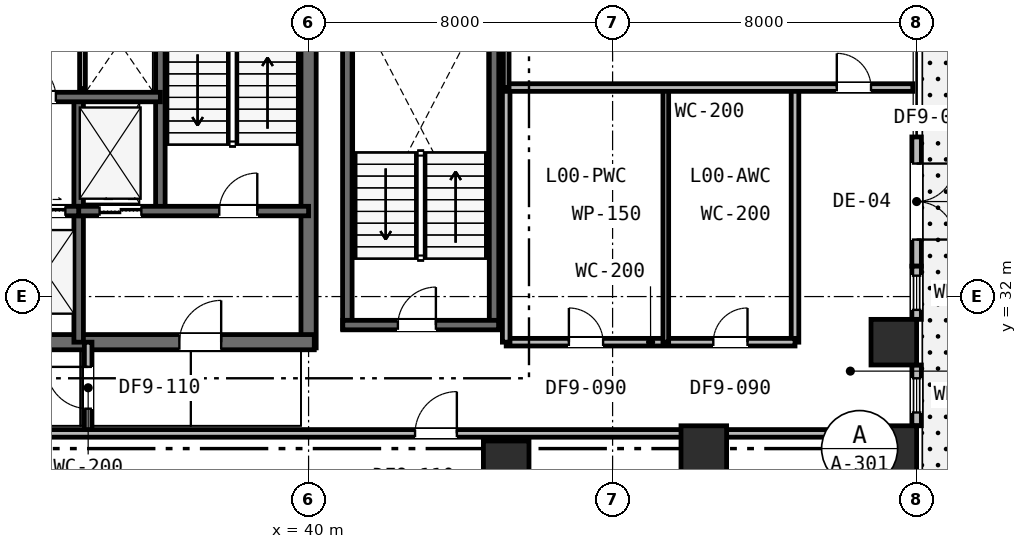
"""IFC4 building model, lengths in metres.
Left out: names, types, materials, properties, quantities, classifications, styles, units other than length and angle.
Written with IfcOpenShell. Run it as: python <this file> out.ifc"""

import sys

from ifc_helpers import new_model, si_unit, direction, frame, frame_2d, origin, origin_2d, place, context, subcontext, project, spatial, rectangle, extrude, element, fill, save


model = new_model("IFC4")
c1 = context("Model", 3, precision=1e-05, world=origin(), true_north=direction((0.0, 1.0)))
c2 = subcontext(c1, "Body", "Model", "MODEL_VIEW")
j1 = project(units=[si_unit("LENGTHUNIT", "METRE"), si_unit("PLANEANGLEUNIT", "RADIAN")], contexts=[c1])
p1 = place(None, origin())
s1 = spatial("IfcSite", under=j1, at=p1, CompositionType="ELEMENT")
p2 = place(p1, origin())
s2 = spatial("IfcBuilding", under=s1, at=p2, CompositionType="ELEMENT")
p3 = place(p2, origin())
s3 = spatial("IfcBuildingStorey", under=s2, at=p3, CompositionType="ELEMENT", Elevation=0.0)
p4 = place(p3, frame((40.0, 30.65, 0.0), z_axis=(0.0, 0.0, 1.0), x_axis=(0.0, 1.0, 0.0)))
e1 = element("IfcWall", 1, at=p4, inside=s3, PredefinedType="SHEAR", context=c2, shape_type="SweptSolid", body=[
    extrude(rectangle(XDim=12.3, YDim=0.4, at=frame_2d((6.15, 0.0))), origin(), (0.0, 0.0, 1.0), 6.0),
])
p5 = place(p3, frame((28.95, 30.8, 0.0), z_axis=(0.0, 0.0, 1.0), x_axis=(1.0, 0.0, 0.0)))
e2 = element("IfcWall", 2, at=p5, inside=s3, PredefinedType="SHEAR", context=c2, shape_type="SweptSolid", body=[
    extrude(rectangle(XDim=11.2, YDim=0.4, at=frame_2d((5.6, 0.0))), origin(), (0.0, 0.0, 1.0), 6.0),
])
p6 = place(p5, frame((7.65, 0.0, 0.0)))
e3 = element("IfcOpeningElement", 3, at=p6, cuts=e2, PredefinedType="OPENING", context=c2, shape_type="SweptSolid", body=[
    extrude(rectangle(XDim=1.1, YDim=2.15, at=frame_2d((0.55, 1.075))), frame((0.0, 0.21, 0.0), z_axis=(0.0, -1.0, 0.0), x_axis=(1.0, 0.0, 0.0)), (0.0, 0.0, 1.0), 0.42),
])
p7 = place(p3, frame((36.1, 34.25, 0.0), z_axis=(0.0, 0.0, 1.0), x_axis=(0.0, 1.0, 0.0)))
e4 = element("IfcWall", 4, at=p7, inside=s3, PredefinedType="SHEAR", context=c2, shape_type="SweptSolid", body=[
    extrude(rectangle(XDim=8.65, YDim=0.25, at=frame_2d((4.325, 0.0))), origin(), (0.0, 0.0, 1.0), 6.0),
])
p8 = place(p3, frame((33.95, 30.8, 0.0), z_axis=(0.0, 0.0, 1.0), x_axis=(0.0, 1.0, 0.0)))
e5 = element("IfcWall", 5, at=p8, inside=s3, PredefinedType="SHEAR", context=c2, shape_type="SweptSolid", body=[
    extrude(rectangle(XDim=6.45, YDim=0.25, at=frame_2d((3.225, 0.0))), origin(), (0.0, 0.0, 1.0), 6.0),
])
p9 = place(p3, frame((33.95, 34.25, 0.0), z_axis=(0.0, 0.0, 1.0), x_axis=(1.0, 0.0, 0.0)))
e6 = element("IfcWall", 6, at=p9, inside=s3, PredefinedType="SHEAR", context=c2, shape_type="SweptSolid", body=[
    extrude(rectangle(XDim=6.05, YDim=0.25, at=frame_2d((3.025, 0.0))), origin(), (0.0, 0.0, 1.0), 6.0),
])
p10 = place(p9, frame((3.7, 0.0, 0.0)))
e7 = element("IfcOpeningElement", 7, at=p10, cuts=e6, PredefinedType="OPENING", context=c2, shape_type="SweptSolid", body=[
    extrude(rectangle(XDim=1.0, YDim=2.15, at=frame_2d((0.5, 1.075))), frame((0.0, 0.135, 0.0), z_axis=(0.0, -1.0, 0.0), x_axis=(1.0, 0.0, 0.0)), (0.0, 0.0, 1.0), 0.27),
])
p11 = place(p9, frame((0.55, 0.0, 0.0)))
e8 = element("IfcOpeningElement", 8, at=p11, cuts=e6, PredefinedType="OPENING", context=c2, shape_type="SweptSolid", body=[
    extrude(rectangle(XDim=1.1, YDim=2.15, at=frame_2d((0.55, 1.075))), frame((0.0, 0.135, 0.0), z_axis=(0.0, -1.0, 0.0), x_axis=(1.0, 0.0, 0.0)), (0.0, 0.0, 1.0), 0.27),
])
p12 = place(p3, frame((28.95, 34.25, 0.0), z_axis=(0.0, 0.0, 1.0), x_axis=(1.0, 0.0, 0.0)))
e9 = element("IfcWall", 9, at=p12, inside=s3, PredefinedType="SHEAR", context=c2, shape_type="SweptSolid", body=[
    extrude(rectangle(XDim=5.0, YDim=0.25, at=frame_2d((2.5, 0.0))), origin(), (0.0, 0.0, 1.0), 6.0),
])
p13 = place(p12, frame((0.3, 0.0, 0.0)))
e10 = element("IfcOpeningElement", 10, at=p13, cuts=e9, PredefinedType="OPENING", context=c2, shape_type="SweptSolid", body=[
    extrude(rectangle(XDim=1.05, YDim=2.15, at=frame_2d((0.525, 1.075))), frame((0.0, 0.135, 0.0), z_axis=(0.0, -1.0, 0.0), x_axis=(1.0, 0.0, 0.0)), (0.0, 0.0, 1.0), 0.27),
])
p14 = place(p12, frame((1.95, 0.0, 0.0)))
e11 = element("IfcOpeningElement", 11, at=p14, cuts=e9, PredefinedType="OPENING", context=c2, shape_type="SweptSolid", body=[
    extrude(rectangle(XDim=1.05, YDim=2.15, at=frame_2d((0.525, 1.075))), frame((0.0, 0.135, 0.0), z_axis=(0.0, -1.0, 0.0), x_axis=(1.0, 0.0, 0.0)), (0.0, 0.0, 1.0), 0.27),
])
p15 = place(p12, frame((3.6, 0.0, 0.0)))
e12 = element("IfcOpeningElement", 12, at=p15, cuts=e9, PredefinedType="OPENING", context=c2, shape_type="SweptSolid", body=[
    extrude(rectangle(XDim=1.05, YDim=2.15, at=frame_2d((0.525, 1.075))), frame((0.0, 0.135, 0.0), z_axis=(0.0, -1.0, 0.0), x_axis=(1.0, 0.0, 0.0)), (0.0, 0.0, 1.0), 0.27),
])
p16 = place(p3, frame((19.9, 37.25, 0.0), z_axis=(0.0, 0.0, 1.0), x_axis=(1.0, 0.0, 0.0)))
e13 = element("IfcWall", 13, at=p16, inside=s3, PredefinedType="SHEAR", context=c2, shape_type="SweptSolid", body=[
    extrude(rectangle(XDim=16.2, YDim=0.25, at=frame_2d((8.1, 0.0))), origin(), (0.0, 0.0, 1.0), 6.0),
])
p17 = place(p16, frame((12.55, 0.0, 0.0)))
e14 = element("IfcOpeningElement", 14, at=p17, cuts=e13, PredefinedType="OPENING", context=c2, shape_type="SweptSolid", body=[
    extrude(rectangle(XDim=0.9, YDim=2.15, at=frame_2d((0.45, 1.075))), frame((0.0, 0.135, 0.0), z_axis=(0.0, -1.0, 0.0), x_axis=(1.0, 0.0, 0.0)), (0.0, 0.0, 1.0), 0.27),
])
p18 = place(p16, frame((2.5, 0.0, 0.0)))
e15 = element("IfcOpeningElement", 15, at=p18, cuts=e13, PredefinedType="OPENING", context=c2, shape_type="SweptSolid", body=[
    extrude(rectangle(XDim=1.05, YDim=2.15, at=frame_2d((0.525, 1.075))), frame((0.0, 0.135, 0.0), z_axis=(0.0, -1.0, 0.0), x_axis=(1.0, 0.0, 0.0)), (0.0, 0.0, 1.0), 0.27),
])
p19 = place(p16, frame((4.4, 0.0, 0.0)))
e16 = element("IfcOpeningElement", 16, at=p19, cuts=e13, PredefinedType="OPENING", context=c2, shape_type="SweptSolid", body=[
    extrude(rectangle(XDim=1.05, YDim=2.15, at=frame_2d((0.525, 1.075))), frame((0.0, 0.135, 0.0), z_axis=(0.0, -1.0, 0.0), x_axis=(1.0, 0.0, 0.0)), (0.0, 0.0, 1.0), 0.27),
])
p20 = place(p16, frame((6.3, 0.0, 0.0)))
e17 = element("IfcOpeningElement", 17, at=p20, cuts=e13, PredefinedType="OPENING", context=c2, shape_type="SweptSolid", body=[
    extrude(rectangle(XDim=1.05, YDim=2.15, at=frame_2d((0.525, 1.075))), frame((0.0, 0.135, 0.0), z_axis=(0.0, -1.0, 0.0), x_axis=(1.0, 0.0, 0.0)), (0.0, 0.0, 1.0), 0.27),
])
p21 = place(p16, frame((8.3, 0.0, 0.0)))
e18 = element("IfcOpeningElement", 18, at=p21, cuts=e13, PredefinedType="OPENING", context=c2, shape_type="SweptSolid", body=[
    extrude(rectangle(XDim=1.1, YDim=2.15, at=frame_2d((0.55, 1.075))), frame((0.0, 0.135, 0.0), z_axis=(0.0, -1.0, 0.0), x_axis=(1.0, 0.0, 0.0)), (0.0, 0.0, 1.0), 0.27),
])
p22 = place(p16, frame((10.4, 0.0, 0.0)))
e19 = element("IfcOpeningElement", 19, at=p22, cuts=e13, PredefinedType="OPENING", context=c2, shape_type="SweptSolid", body=[
    extrude(rectangle(XDim=1.1, YDim=2.15, at=frame_2d((0.55, 1.075))), frame((0.0, 0.135, 0.0), z_axis=(0.0, -1.0, 0.0), x_axis=(1.0, 0.0, 0.0)), (0.0, 0.0, 1.0), 0.27),
])
for number, where, z_axis, x_axis in (
    (20, (41.02, 31.15, 0.0), (0.0, 0.0, 1.0), (0.0, 1.0, 0.0)),
    (21, (44.88, 31.15, 0.0), (0.0, 0.0, 1.0), (0.0, 1.0, 0.0)),
):
    element("IfcWall", number, at=place(p3, frame(where, z_axis=z_axis, x_axis=x_axis)), inside=s3, PredefinedType="SHEAR", context=c2, shape_type="SweptSolid", body=[
        extrude(rectangle(XDim=8.8, YDim=0.25, at=frame_2d((4.4, 0.0))), origin(), (0.0, 0.0, 1.0), 6.0),
    ])
p23 = place(p3, frame((40.9, 31.25, 0.0), z_axis=(0.0, 0.0, 1.0), x_axis=(1.0, 0.0, 0.0)))
e22 = element("IfcWall", 22, at=p23, inside=s3, PredefinedType="SHEAR", context=c2, shape_type="SweptSolid", body=[
    extrude(rectangle(XDim=4.1, YDim=0.25, at=frame_2d((2.05, 0.0))), origin(), (0.0, 0.0, 1.0), 6.0),
])
p24 = place(p23, frame((1.45, 0.0, 0.0)))
e23 = element("IfcOpeningElement", 23, at=p24, cuts=e22, PredefinedType="OPENING", context=c2, shape_type="SweptSolid", body=[
    extrude(rectangle(XDim=1.0, YDim=2.15, at=frame_2d((0.5, 1.075))), frame((0.0, 0.135, 0.0), z_axis=(0.0, -1.0, 0.0), x_axis=(1.0, 0.0, 0.0)), (0.0, 0.0, 1.0), 0.27),
])
for number, where, z_axis, x_axis in (
    (24, (45.2, 27.6, 0.0), (0.0, 0.0, 1.0), (1.0, 0.0, 0.0)),
    (25, (50.4, 28.0, 0.0), (0.0, 0.0, 1.0), (1.0, 0.0, 0.0)),
    (26, (55.4, 28.0, 0.0), (0.0, 0.0, 1.0), (1.0, 0.0, 0.0)),
    (27, (55.4, 30.8, 0.0), (0.0, 0.0, 1.0), (1.0, 0.0, 0.0)),
):
    element("IfcColumn", number, at=place(p3, frame(where, z_axis=z_axis, x_axis=x_axis)), inside=s3, PredefinedType="COLUMN", context=c2, shape_type="SweptSolid", body=[
        extrude(rectangle(XDim=1.2, YDim=1.2, at=origin_2d()), origin(), (0.0, 0.0, 1.0), 6.0),
    ])
p25 = place(p3, frame((56.0, 36.2, 0.0), z_axis=(0.0, 0.0, 1.0), x_axis=(0.0, -1.0, 0.0)))
e28 = element("IfcWall", 28, at=p25, inside=s3, PredefinedType="STANDARD", context=c2, shape_type="SweptSolid", body=[
    extrude(rectangle(XDim=3.4, YDim=0.25, at=frame_2d((1.7, 0.0))), origin(), (0.0, 0.0, 1.0), 5.67),
])
p26 = place(p25, frame((0.7, 0.0, 0.0)))
e29 = element("IfcOpeningElement", 29, at=p26, cuts=e28, PredefinedType="OPENING", context=c2, shape_type="SweptSolid", body=[
    extrude(rectangle(XDim=2.0, YDim=2.4, at=frame_2d((1.0, 1.2))), frame((0.0, 0.135, 0.0), z_axis=(0.0, -1.0, 0.0), x_axis=(1.0, 0.0, 0.0)), (0.0, 0.0, 1.0), 0.27),
])
p27 = place(p3, frame((56.0, 28.6, 0.0), z_axis=(0.0, 0.0, 1.0), x_axis=(0.0, 1.0, 0.0)))
e30 = element("IfcWall", 30, at=p27, inside=s3, PredefinedType="STANDARD", context=c2, shape_type="SweptSolid", body=[
    extrude(rectangle(XDim=1.6, YDim=0.25, at=frame_2d((0.8, 0.0))), origin(), (0.0, 0.0, 1.0), 5.67),
])
p28 = place(p27, frame((0.35, 0.0, 0.9)))
e31 = element("IfcOpeningElement", 31, at=p28, cuts=e30, PredefinedType="OPENING", context=c2, shape_type="SweptSolid", body=[
    extrude(rectangle(XDim=0.9, YDim=1.55, at=frame_2d((0.45, 0.775))), frame((0.0, 0.135, 0.0), z_axis=(0.0, -1.0, 0.0), x_axis=(1.0, 0.0, 0.0)), (0.0, 0.0, 1.0), 0.27),
])
p29 = place(p3, frame((56.0, 31.4, 0.0), z_axis=(0.0, 0.0, 1.0), x_axis=(0.0, 1.0, 0.0)))
e32 = element("IfcWall", 32, at=p29, inside=s3, PredefinedType="STANDARD", context=c2, shape_type="SweptSolid", body=[
    extrude(rectangle(XDim=1.4, YDim=0.25, at=frame_2d((0.7, 0.0))), origin(), (0.0, 0.0, 1.0), 5.67),
])
p30 = place(p29, frame((0.25, 0.0, 0.9)))
e33 = element("IfcOpeningElement", 33, at=p30, cuts=e32, PredefinedType="OPENING", context=c2, shape_type="SweptSolid", body=[
    extrude(rectangle(XDim=0.9, YDim=1.55, at=frame_2d((0.45, 0.775))), frame((0.0, 0.135, 0.0), z_axis=(0.0, -1.0, 0.0), x_axis=(1.0, 0.0, 0.0)), (0.0, 0.0, 1.0), 0.27),
])
p31 = place(p3, frame((34.05, 37.473, 0.0), z_axis=(0.0, 0.0, 1.0), x_axis=(0.0, 1.0, 0.0)))
e34 = element("IfcWall", 34, at=p31, inside=s3, PredefinedType="PLUMBINGWALL", context=c2, shape_type="SweptSolid", body=[
    extrude(rectangle(XDim=2.577, YDim=0.15, at=frame_2d((1.288, 0.0))), origin(), (0.0, 0.0, 1.0), 5.67),
])
p32 = place(p3, frame((34.2, 28.4, 0.0), z_axis=(0.0, 0.0, 1.0), x_axis=(0.0, 1.0, 0.0)))
e35 = element("IfcWall", 35, at=p32, inside=s3, PredefinedType="PARTITIONING", context=c2, shape_type="SweptSolid", body=[
    extrude(rectangle(XDim=2.4, YDim=0.2, at=frame_2d((1.2, 0.0))), origin(), (0.0, 0.0, 1.0), 5.26),
])
p33 = place(p32, frame((0.65, 0.0, 0.0)))
e36 = element("IfcOpeningElement", 36, at=p33, cuts=e35, PredefinedType="OPENING", context=c2, shape_type="SweptSolid", body=[
    extrude(rectangle(XDim=1.1, YDim=2.15, at=frame_2d((0.55, 1.075))), frame((0.0, 0.11, 0.0), z_axis=(0.0, -1.0, 0.0), x_axis=(1.0, 0.0, 0.0)), (0.0, 0.0, 1.0), 0.22),
])
p34 = place(p3, frame((52.8, 30.8, 0.0), z_axis=(0.0, 0.0, 1.0), x_axis=(0.0, 1.0, 0.0)))
e37 = element("IfcWall", 37, at=p34, inside=s3, PredefinedType="PARTITIONING", context=c2, shape_type="SweptSolid", body=[
    extrude(rectangle(XDim=6.7, YDim=0.2, at=frame_2d((3.35, 0.0))), origin(), (0.0, 0.0, 1.0), 5.02),
])
p35 = place(p3, frame((45.2, 30.8, 0.0), z_axis=(0.0, 0.0, 1.0), x_axis=(1.0, 0.0, 0.0)))
e38 = element("IfcWall", 38, at=p35, inside=s3, PredefinedType="PARTITIONING", context=c2, shape_type="SweptSolid", body=[
    extrude(rectangle(XDim=7.6, YDim=0.2, at=frame_2d((3.8, 0.0))), origin(), (0.0, 0.0, 1.0), 5.02),
])
p36 = place(p35, frame((1.65, 0.0, 0.0)))
e39 = element("IfcOpeningElement", 39, at=p36, cuts=e38, PredefinedType="OPENING", context=c2, shape_type="SweptSolid", body=[
    extrude(rectangle(XDim=0.9, YDim=2.15, at=frame_2d((0.45, 1.075))), frame((0.0, 0.11, 0.0), z_axis=(0.0, -1.0, 0.0), x_axis=(1.0, 0.0, 0.0)), (0.0, 0.0, 1.0), 0.22),
])
p37 = place(p35, frame((5.45, 0.0, 0.0)))
e40 = element("IfcOpeningElement", 40, at=p37, cuts=e38, PredefinedType="OPENING", context=c2, shape_type="SweptSolid", body=[
    extrude(rectangle(XDim=0.9, YDim=2.15, at=frame_2d((0.45, 1.075))), frame((0.0, 0.11, 0.0), z_axis=(0.0, -1.0, 0.0), x_axis=(1.0, 0.0, 0.0)), (0.0, 0.0, 1.0), 0.22),
])
p38 = place(p3, frame((45.2, 30.8, 0.0), z_axis=(0.0, 0.0, 1.0), x_axis=(0.0, 1.0, 0.0)))
e41 = element("IfcWall", 41, at=p38, inside=s3, PredefinedType="PARTITIONING", context=c2, shape_type="SweptSolid", body=[
    extrude(rectangle(XDim=6.7, YDim=0.2, at=frame_2d((3.35, 0.0))), origin(), (0.0, 0.0, 1.0), 5.02),
])
p39 = place(p3, frame((49.4, 30.8, 0.0), z_axis=(0.0, 0.0, 1.0), x_axis=(0.0, 1.0, 0.0)))
e42 = element("IfcWall", 42, at=p39, inside=s3, PredefinedType="PARTITIONING", context=c2, shape_type="SweptSolid", body=[
    extrude(rectangle(XDim=6.7, YDim=0.15, at=frame_2d((3.35, 0.0))), origin(), (0.0, 0.0, 1.0), 5.02),
])
p40 = place(p3, frame((45.2, 37.5, 0.0), z_axis=(0.0, 0.0, 1.0), x_axis=(1.0, 0.0, 0.0)))
e43 = element("IfcWall", 43, at=p40, inside=s3, PredefinedType="PARTITIONING", context=c2, shape_type="SweptSolid", body=[
    extrude(rectangle(XDim=10.7, YDim=0.2, at=frame_2d((5.35, 0.0))), origin(), (0.0, 0.0, 1.0), 5.02),
])
p41 = place(p40, frame((8.7, 0.0, 0.0)))
e44 = element("IfcOpeningElement", 44, at=p41, cuts=e43, PredefinedType="OPENING", context=c2, shape_type="SweptSolid", body=[
    extrude(rectangle(XDim=0.9, YDim=2.15, at=frame_2d((0.45, 1.075))), frame((0.0, 0.11, 0.0), z_axis=(0.0, -1.0, 0.0), x_axis=(1.0, 0.0, 0.0)), (0.0, 0.0, 1.0), 0.22),
])
p42 = place(p3, frame((45.2, 37.5, 0.0), z_axis=(0.0, 0.0, 1.0), x_axis=(0.0, 1.0, 0.0)))
e45 = element("IfcWall", 45, at=p42, inside=s3, PredefinedType="PARTITIONING", context=c2, shape_type="SweptSolid", body=[
    extrude(rectangle(XDim=10.4, YDim=0.15, at=frame_2d((5.2, 0.0))), origin(), (0.0, 0.0, 1.0), 5.02),
])
p43 = place(p3, frame((3.1, 28.4, 0.0), z_axis=(0.0, 0.0, 1.0), x_axis=(1.0, 0.0, 0.0)))
e46 = element("IfcWall", 46, at=p43, inside=s3, PredefinedType="PARTITIONING", context=c2, shape_type="SweptSolid", body=[
    extrude(rectangle(XDim=52.8, YDim=0.2, at=frame_2d((26.4, 0.0))), origin(), (0.0, 0.0, 1.0), 5.02),
])
p44 = place(p43, frame((8.7, 0.0, 0.0)))
e47 = element("IfcOpeningElement", 47, at=p44, cuts=e46, PredefinedType="OPENING", context=c2, shape_type="SweptSolid", body=[
    extrude(rectangle(XDim=1.0, YDim=2.15, at=frame_2d((0.5, 1.075))), frame((0.0, 0.11, 0.0), z_axis=(0.0, -1.0, 0.0), x_axis=(1.0, 0.0, 0.0)), (0.0, 0.0, 1.0), 0.22),
])
p45 = place(p43, frame((23.25, 0.0, 0.0)))
e48 = element("IfcOpeningElement", 48, at=p45, cuts=e46, PredefinedType="OPENING", context=c2, shape_type="SweptSolid", body=[
    extrude(rectangle(XDim=1.1, YDim=2.15, at=frame_2d((0.55, 1.075))), frame((0.0, 0.11, 0.0), z_axis=(0.0, -1.0, 0.0), x_axis=(1.0, 0.0, 0.0)), (0.0, 0.0, 1.0), 0.22),
])
p46 = place(p43, frame((39.702, 0.0, 0.0)))
e49 = element("IfcOpeningElement", 49, at=p46, cuts=e46, PredefinedType="OPENING", context=c2, shape_type="SweptSolid", body=[
    extrude(rectangle(XDim=1.1, YDim=2.15, at=frame_2d((0.55, 1.075))), frame((0.0, 0.11, 0.0), z_axis=(0.0, -1.0, 0.0), x_axis=(1.0, 0.0, 0.0)), (0.0, 0.0, 1.0), 0.22),
])
p47 = place(p43, frame((3.34, 0.0, 0.0)))
e50 = element("IfcOpeningElement", 50, at=p47, cuts=e46, PredefinedType="OPENING", context=c2, shape_type="SweptSolid", body=[
    extrude(rectangle(XDim=1.1, YDim=2.15, at=frame_2d((0.55, 1.075))), frame((0.0, 0.11, 0.0), z_axis=(0.0, -1.0, 0.0), x_axis=(1.0, 0.0, 0.0)), (0.0, 0.0, 1.0), 0.22),
])
p48 = place(p26, origin())
e51 = element("IfcDoor", 51, at=p48, inside=s3, OperationType="DOUBLE_DOOR_SINGLE_SWING", PredefinedType="DOOR", context=c2, shape_type="SweptSolid", body=[
    extrude(rectangle(XDim=2.0, YDim=2.4, at=frame_2d((1.0, 1.2))), frame((0.0, 0.025, 0.0), z_axis=(0.0, -1.0, 0.0), x_axis=(1.0, 0.0, 0.0)), (0.0, 0.0, 1.0), 0.05),
])
fill(e29, e51)
p49 = place(p28, origin())
e52 = element("IfcWindow", 52, at=p49, inside=s3, PartitioningType="SINGLE_PANEL", PredefinedType="WINDOW", context=c2, shape_type="SweptSolid", body=[
    extrude(rectangle(XDim=0.9, YDim=1.55, at=frame_2d((0.45, 0.775))), frame((0.0, 0.03, 0.0), z_axis=(0.0, -1.0, 0.0), x_axis=(1.0, 0.0, 0.0)), (0.0, 0.0, 1.0), 0.06),
])
fill(e31, e52)
p50 = place(p30, origin())
e53 = element("IfcWindow", 53, at=p50, inside=s3, PartitioningType="SINGLE_PANEL", PredefinedType="WINDOW", context=c2, shape_type="SweptSolid", body=[
    extrude(rectangle(XDim=0.9, YDim=1.55, at=frame_2d((0.45, 0.775))), frame((0.0, 0.03, 0.0), z_axis=(0.0, -1.0, 0.0), x_axis=(1.0, 0.0, 0.0)), (0.0, 0.0, 1.0), 0.06),
])
fill(e33, e53)
p51 = place(p10, origin())
e54 = element("IfcDoor", 54, at=p51, inside=s3, OperationType="SINGLE_SWING_RIGHT", PredefinedType="DOOR", context=c2, shape_type="SweptSolid", body=[
    extrude(rectangle(XDim=1.0, YDim=2.15, at=frame_2d((0.5, 1.075))), frame((0.0, 0.025, 0.0), z_axis=(0.0, -1.0, 0.0), x_axis=(1.0, 0.0, 0.0)), (0.0, 0.0, 1.0), 0.05),
])
fill(e7, e54)
p52 = place(p6, origin())
e55 = element("IfcDoor", 55, at=p52, inside=s3, OperationType="SINGLE_SWING_RIGHT", PredefinedType="DOOR", context=c2, shape_type="SweptSolid", body=[
    extrude(rectangle(XDim=1.1, YDim=2.15, at=frame_2d((0.55, 1.075))), frame((0.0, 0.025, 0.0), z_axis=(0.0, -1.0, 0.0), x_axis=(1.0, 0.0, 0.0)), (0.0, 0.0, 1.0), 0.05),
])
fill(e3, e55)
p53 = place(p24, origin())
e56 = element("IfcDoor", 56, at=p53, inside=s3, OperationType="SINGLE_SWING_RIGHT", PredefinedType="DOOR", context=c2, shape_type="SweptSolid", body=[
    extrude(rectangle(XDim=1.0, YDim=2.15, at=frame_2d((0.5, 1.075))), frame((0.0, 0.025, 0.0), z_axis=(0.0, -1.0, 0.0), x_axis=(1.0, 0.0, 0.0)), (0.0, 0.0, 1.0), 0.05),
])
fill(e23, e56)
p54 = place(p17, origin())
e57 = element("IfcDoor", 57, at=p54, inside=s3, OperationType="SINGLE_SWING_LEFT", PredefinedType="DOOR", context=c2, shape_type="SweptSolid", body=[
    extrude(rectangle(XDim=0.9, YDim=2.15, at=frame_2d((0.45, 1.075))), frame((0.0, 0.025, 0.0), z_axis=(0.0, -1.0, 0.0), x_axis=(1.0, 0.0, 0.0)), (0.0, 0.0, 1.0), 0.05),
])
fill(e14, e57)
p55 = place(p33, origin())
e58 = element("IfcDoor", 58, at=p55, inside=s3, OperationType="SINGLE_SWING_RIGHT", PredefinedType="DOOR", context=c2, shape_type="SweptSolid", body=[
    extrude(rectangle(XDim=1.1, YDim=2.15, at=frame_2d((0.55, 1.075))), frame((0.0, 0.025, 0.0), z_axis=(0.0, -1.0, 0.0), x_axis=(1.0, 0.0, 0.0)), (0.0, 0.0, 1.0), 0.05),
])
fill(e36, e58)
p56 = place(p36, origin())
e59 = element("IfcDoor", 59, at=p56, inside=s3, OperationType="SINGLE_SWING_LEFT", PredefinedType="DOOR", context=c2, shape_type="SweptSolid", body=[
    extrude(rectangle(XDim=0.9, YDim=2.15, at=frame_2d((0.45, 1.075))), frame((0.0, 0.025, 0.0), z_axis=(0.0, -1.0, 0.0), x_axis=(1.0, 0.0, 0.0)), (0.0, 0.0, 1.0), 0.05),
])
fill(e39, e59)
p57 = place(p37, origin())
e60 = element("IfcDoor", 60, at=p57, inside=s3, OperationType="SINGLE_SWING_RIGHT", PredefinedType="DOOR", context=c2, shape_type="SweptSolid", body=[
    extrude(rectangle(XDim=0.9, YDim=2.15, at=frame_2d((0.45, 1.075))), frame((0.0, 0.025, 0.0), z_axis=(0.0, -1.0, 0.0), x_axis=(1.0, 0.0, 0.0)), (0.0, 0.0, 1.0), 0.05),
])
fill(e40, e60)
p58 = place(p41, origin())
e61 = element("IfcDoor", 61, at=p58, inside=s3, OperationType="SINGLE_SWING_LEFT", PredefinedType="DOOR", context=c2, shape_type="SweptSolid", body=[
    extrude(rectangle(XDim=0.9, YDim=2.15, at=frame_2d((0.45, 1.075))), frame((0.0, 0.025, 0.0), z_axis=(0.0, -1.0, 0.0), x_axis=(1.0, 0.0, 0.0)), (0.0, 0.0, 1.0), 0.05),
])
fill(e44, e61)
p59 = place(p46, origin())
e62 = element("IfcDoor", 62, at=p59, inside=s3, OperationType="SINGLE_SWING_RIGHT", PredefinedType="DOOR", context=c2, shape_type="SweptSolid", body=[
    extrude(rectangle(XDim=1.1, YDim=2.15, at=frame_2d((0.55, 1.075))), frame((0.0, 0.025, 0.0), z_axis=(0.0, -1.0, 0.0), x_axis=(1.0, 0.0, 0.0)), (0.0, 0.0, 1.0), 0.05),
])
fill(e49, e62)
p60 = place(p11, origin())
e63 = element("IfcDoor", 63, at=p60, inside=s3, OperationType="DOUBLE_DOOR_SLIDING", PredefinedType="DOOR", context=c2, shape_type="SweptSolid", body=[
    extrude(rectangle(XDim=1.1, YDim=2.15, at=frame_2d((0.55, 1.075))), frame((0.0, 0.025, 0.0), z_axis=(0.0, -1.0, 0.0), x_axis=(1.0, 0.0, 0.0)), (0.0, 0.0, 1.0), 0.05),
])
fill(e8, e63)
p61 = place(p15, origin())
e64 = element("IfcDoor", 64, at=p61, inside=s3, OperationType="DOUBLE_DOOR_SLIDING", PredefinedType="DOOR", context=c2, shape_type="SweptSolid", body=[
    extrude(rectangle(XDim=1.05, YDim=2.15, at=frame_2d((0.525, 1.075))), frame((0.0, 0.025, 0.0), z_axis=(0.0, -1.0, 0.0), x_axis=(1.0, 0.0, 0.0)), (0.0, 0.0, 1.0), 0.05),
])
fill(e12, e64)
save(model, sys.argv[1])
